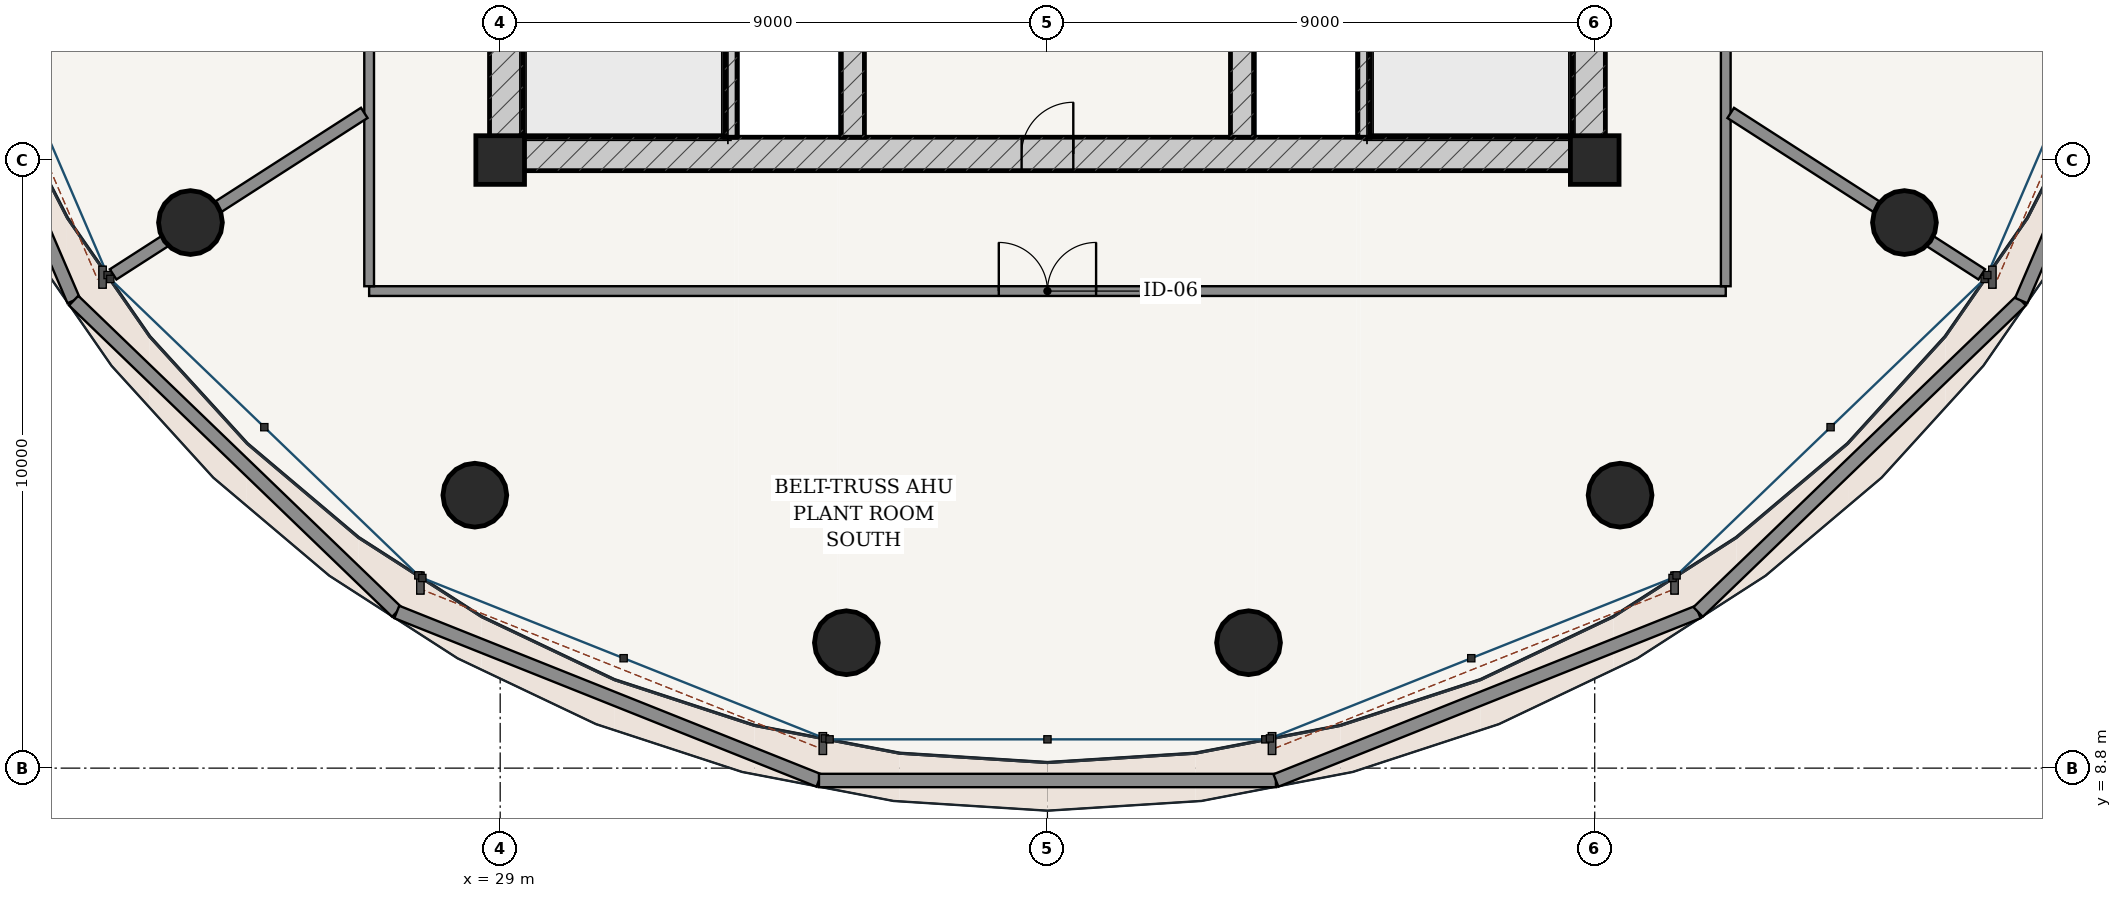
"""IFC4 building model, lengths in metres.
Left out: names, types, materials, properties, quantities, classifications, styles, units other than length and angle.
Written with IfcOpenShell. Run it as: python <this file> out.ifc"""

import sys

from ifc_helpers import new_model, si_unit, direction, frame, frame_2d, origin, origin_2d, place, context, subcontext, project, spatial, rectangle, hollow_circle, extrude, source, transform, mapped, element, fill, save


model = new_model("IFC4")
c1 = context("Model", 3, precision=1e-05, world=origin(), true_north=direction((-0.2419218956, 0.970295726276)))
c2 = subcontext(c1, "Body", "Model", "MODEL_VIEW")
j1 = project(units=[si_unit("LENGTHUNIT", "METRE"), si_unit("PLANEANGLEUNIT", "RADIAN")], contexts=[c1])
p1 = place(None, origin())
s1 = spatial("IfcSite", under=j1, at=p1, CompositionType="ELEMENT")
p2 = place(p1, origin())
s2 = spatial("IfcBuilding", under=s1, at=p2, CompositionType="ELEMENT")
p3 = place(p2, frame((0.0, 0.0, 300.7)))
s3 = spatial("IfcBuildingStorey", under=s2, at=p3, CompositionType="ELEMENT", Elevation=300.7)
for number, where, z_axis, x_axis in (
    (1, (29.0, 18.8, 0.0), (0.0, 0.0, 1.0), (1.0, 0.0, 0.0)),
    (2, (47.0, 18.8, 0.0), (0.0, 0.0, 1.0), (1.0, 0.0, 0.0)),
):
    element("IfcColumn", number, at=place(p3, frame(where, z_axis=z_axis, x_axis=x_axis)), inside=s3, PredefinedType="COLUMN", context=c2, shape_type="SweptSolid", body=[
        extrude(rectangle(XDim=0.8, YDim=0.8, at=origin_2d()), origin(), (0.0, 0.0, 1.0), 5.4),
    ])
p4 = place(p3, frame((28.825, 18.9, 0.0), z_axis=(0.0, 0.0, 1.0), x_axis=(1.0, 0.0, 0.0)))
e3 = element("IfcWall", 3, at=p4, inside=s3, PredefinedType="SHEAR", context=c2, shape_type="SweptSolid", body=[
    extrude(rectangle(XDim=18.35, YDim=0.55, at=frame_2d((9.175, 0.0))), origin(), (0.0, 0.0, 1.0), 4.98),
])
p5 = place(p4, frame((8.75, 0.0, 0.0)))
e4 = element("IfcOpeningElement", 4, at=p5, cuts=e3, PredefinedType="OPENING", context=c2, shape_type="SweptSolid", body=[
    extrude(rectangle(XDim=0.85, YDim=2.1, at=frame_2d((0.425, 1.05))), frame((0.0, 0.285, 0.0), z_axis=(0.0, -1.0, 0.0), x_axis=(1.0, 0.0, 0.0)), (0.0, 0.0, 1.0), 0.57),
])
p6 = place(p3, frame((29.1, 19.175, 0.0), z_axis=(0.0, 0.0, 1.0), x_axis=(0.0, 1.0, 0.0)))
e5 = element("IfcWall", 5, at=p6, inside=s3, PredefinedType="SHEAR", context=c2, shape_type="SweptSolid", body=[
    extrude(rectangle(XDim=15.25, YDim=0.55, at=frame_2d((7.625, 0.0))), origin(), (0.0, 0.0, 1.0), 4.98),
])
p7 = place(p6, frame((9.875, 0.0, 0.0)))
e6 = element("IfcOpeningElement", 6, at=p7, cuts=e5, PredefinedType="OPENING", context=c2, shape_type="SweptSolid", body=[
    extrude(rectangle(XDim=1.5, YDim=2.2, at=frame_2d((0.75, 1.1))), frame((0.0, 0.285, 0.0), z_axis=(0.0, -1.0, 0.0), x_axis=(1.0, 0.0, 0.0)), (0.0, 0.0, 1.0), 0.57),
])
p8 = place(p3, frame((46.9, 19.175, 0.0), z_axis=(0.0, 0.0, 1.0), x_axis=(0.0, 1.0, 0.0)))
e7 = element("IfcWall", 7, at=p8, inside=s3, PredefinedType="SHEAR", context=c2, shape_type="SweptSolid", body=[
    extrude(rectangle(XDim=15.25, YDim=0.55, at=frame_2d((7.625, 0.0))), origin(), (0.0, 0.0, 1.0), 4.98),
])
p9 = place(p8, frame((9.875, 0.0, 0.0)))
e8 = element("IfcOpeningElement", 8, at=p9, cuts=e7, PredefinedType="OPENING", context=c2, shape_type="SweptSolid", body=[
    extrude(rectangle(XDim=1.5, YDim=2.2, at=frame_2d((0.75, 1.1))), frame((0.0, 0.285, 0.0), z_axis=(0.0, -1.0, 0.0), x_axis=(1.0, 0.0, 0.0)), (0.0, 0.0, 1.0), 0.57),
])
for number, where, z_axis, x_axis in (
    (9, (32.795, 19.175, 0.0), (0.0, 0.0, 1.0), (0.0, 1.0, 0.0)),
    (10, (43.205, 19.175, 0.0), (0.0, 0.0, 1.0), (0.0, 1.0, 0.0)),
):
    element("IfcWall", number, at=place(p3, frame(where, z_axis=z_axis, x_axis=x_axis)), inside=s3, PredefinedType="SOLIDWALL", context=c2, shape_type="SweptSolid", body=[
        extrude(rectangle(XDim=7.375, YDim=0.2, at=frame_2d((3.688, 0.0))), origin(), (0.0, 0.0, 1.0), 4.98),
    ])
p10 = place(p3, frame((34.8, 19.175, 0.0), z_axis=(0.0, 0.0, 1.0), x_axis=(0.0, 1.0, 0.0)))
e11 = element("IfcWall", 11, at=p10, inside=s3, PredefinedType="SHEAR", context=c2, shape_type="SweptSolid", body=[
    extrude(rectangle(XDim=15.25, YDim=0.38, at=frame_2d((7.625, 0.0))), origin(), (0.0, 0.0, 1.0), 4.98),
])
p11 = place(p10, frame((7.8, 0.0, 0.0)))
e12 = element("IfcOpeningElement", 12, at=p11, cuts=e11, PredefinedType="OPENING", context=c2, shape_type="SweptSolid", body=[
    extrude(rectangle(XDim=1.05, YDim=2.15, at=frame_2d((0.525, 1.075))), frame((0.0, 0.2, 0.0), z_axis=(0.0, -1.0, 0.0), x_axis=(1.0, 0.0, 0.0)), (0.0, 0.0, 1.0), 0.4),
])
p12 = place(p3, frame((41.2, 19.175, 0.0), z_axis=(0.0, 0.0, 1.0), x_axis=(0.0, 1.0, 0.0)))
e13 = element("IfcWall", 13, at=p12, inside=s3, PredefinedType="SHEAR", context=c2, shape_type="SweptSolid", body=[
    extrude(rectangle(XDim=15.25, YDim=0.38, at=frame_2d((7.625, 0.0))), origin(), (0.0, 0.0, 1.0), 4.98),
])
p13 = place(p12, frame((7.8, 0.0, 0.0)))
e14 = element("IfcOpeningElement", 14, at=p13, cuts=e13, PredefinedType="OPENING", context=c2, shape_type="SweptSolid", body=[
    extrude(rectangle(XDim=1.05, YDim=2.15, at=frame_2d((0.525, 1.075))), frame((0.0, 0.2, 0.0), z_axis=(0.0, -1.0, 0.0), x_axis=(1.0, 0.0, 0.0)), (0.0, 0.0, 1.0), 0.4),
])
for number, where, z_axis, x_axis in (
    (15, (23.906, 17.772, 0.0), (0.0, 0.0, 1.0), (1.0, 0.0, 0.0)),
    (16, (28.583, 13.289, 0.0), (0.0, 0.0, 1.0), (1.0, 0.0, 0.0)),
    (17, (34.693, 10.862, 0.0), (0.0, 0.0, 1.0), (1.0, 0.0, 0.0)),
    (18, (41.307, 10.862, 0.0), (0.0, 0.0, 1.0), (1.0, 0.0, 0.0)),
    (19, (47.417, 13.289, 0.0), (0.0, 0.0, 1.0), (1.0, 0.0, 0.0)),
    (20, (52.094, 17.772, 0.0), (0.0, 0.0, 1.0), (1.0, 0.0, 0.0)),
):
    element("IfcColumn", number, at=place(p3, frame(where, z_axis=z_axis, x_axis=x_axis)), inside=s3, PredefinedType="COLUMN", context=c2, shape_type="SweptSolid", body=[
        extrude(hollow_circle(Radius=0.525, WallThickness=0.035, at=origin_2d()), origin(), (0.0, 0.0, 1.0), 5.4),
    ])
p14 = place(p3, frame((19.11, 23.179, 0.0), z_axis=(0.0, 0.0, 1.0), x_axis=(0.394882037325, -0.918731830622, 0.0)))
e21 = element("IfcWall", 21, at=p14, inside=s3, PredefinedType="PARAPET", context=c2, shape_type="SweptSolid", body=[
    extrude(rectangle(XDim=7.282, YDim=0.22, at=frame_2d((3.641, 0.0))), origin(), (0.0, 0.0, 1.0), 1.15),
])
p15 = place(p3, frame((21.986, 16.489, 0.0), z_axis=(0.0, 0.0, 1.0), x_axis=(0.720086306967, -0.693884508055, 0.0)))
e22 = element("IfcWall", 22, at=p15, inside=s3, PredefinedType="PARAPET", context=c2, shape_type="SweptSolid", body=[
    extrude(rectangle(XDim=7.38, YDim=0.22, at=frame_2d((3.69, 0.0))), origin(), (0.0, 0.0, 1.0), 1.15),
])
p16 = place(p3, frame((27.3, 11.368, 0.0), z_axis=(0.0, 0.0, 1.0), x_axis=(0.928748972375, -0.370709247677, 0.0)))
e23 = element("IfcWall", 23, at=p16, inside=s3, PredefinedType="PARAPET", context=c2, shape_type="SweptSolid", body=[
    extrude(rectangle(XDim=7.476, YDim=0.22, at=frame_2d((3.738, 0.0))), origin(), (0.0, 0.0, 1.0), 1.15),
])
p17 = place(p3, frame((34.243, 8.597, 0.0), z_axis=(0.0, 0.0, 1.0), x_axis=(1.0, 0.0, 0.0)))
e24 = element("IfcWall", 24, at=p17, inside=s3, PredefinedType="PARAPET", context=c2, shape_type="SweptSolid", body=[
    extrude(rectangle(XDim=7.515, YDim=0.22, at=frame_2d((3.757, 0.0))), origin(), (0.0, 0.0, 1.0), 1.15),
])
p18 = place(p3, frame((41.757, 8.597, 0.0), z_axis=(0.0, 0.0, 1.0), x_axis=(0.928748972375, 0.370709247677, 0.0)))
e25 = element("IfcWall", 25, at=p18, inside=s3, PredefinedType="PARAPET", context=c2, shape_type="SweptSolid", body=[
    extrude(rectangle(XDim=7.476, YDim=0.22, at=frame_2d((3.738, 0.0))), origin(), (0.0, 0.0, 1.0), 1.15),
])
p19 = place(p3, frame((48.7, 11.368, 0.0), z_axis=(0.0, 0.0, 1.0), x_axis=(0.720086306967, 0.693884508055, 0.0)))
e26 = element("IfcWall", 26, at=p19, inside=s3, PredefinedType="PARAPET", context=c2, shape_type="SweptSolid", body=[
    extrude(rectangle(XDim=7.38, YDim=0.22, at=frame_2d((3.69, 0.0))), origin(), (0.0, 0.0, 1.0), 1.15),
])
p20 = place(p3, frame((54.014, 16.489, 0.0), z_axis=(0.0, 0.0, 1.0), x_axis=(0.394882037325, 0.918731830622, 0.0)))
e27 = element("IfcWall", 27, at=p20, inside=s3, PredefinedType="PARAPET", context=c2, shape_type="SweptSolid", body=[
    extrude(rectangle(XDim=7.282, YDim=0.22, at=frame_2d((3.641, 0.0))), origin(), (0.0, 0.0, 1.0), 1.15),
])
p21 = place(p3, frame((26.845, 16.645, 0.0), z_axis=(0.0, 0.0, 1.0), x_axis=(1.0, 0.0, 0.0)))
e28 = element("IfcWall", 28, at=p21, inside=s3, PredefinedType="PARTITIONING", context=c2, shape_type="SweptSolid", body=[
    extrude(rectangle(XDim=22.31, YDim=0.16, at=frame_2d((11.155, 0.0))), origin(), (0.0, 0.0, 1.0), 4.552),
])
p22 = place(p21, frame((10.355, 0.0, 0.0)))
e29 = element("IfcOpeningElement", 29, at=p22, cuts=e28, PredefinedType="OPENING", context=c2, shape_type="SweptSolid", body=[
    extrude(rectangle(XDim=1.6, YDim=2.25, at=frame_2d((0.8, 1.125))), frame((0.0, 0.09, 0.0), z_axis=(0.0, -1.0, 0.0), x_axis=(1.0, 0.0, 0.0)), (0.0, 0.0, 1.0), 0.18),
])
p23 = place(p3, frame((26.845, 16.725, 0.0), z_axis=(0.0, 0.0, 1.0), x_axis=(0.0, 1.0, 0.0)))
e30 = element("IfcWall", 30, at=p23, inside=s3, PredefinedType="PARTITIONING", context=c2, shape_type="SweptSolid", body=[
    extrude(rectangle(XDim=20.15, YDim=0.16, at=frame_2d((10.075, 0.0))), origin(), (0.0, 0.0, 1.0), 4.552),
])
p24 = place(p23, frame((9.325, 0.0, 0.0)))
e31 = element("IfcOpeningElement", 31, at=p24, cuts=e30, PredefinedType="OPENING", context=c2, shape_type="SweptSolid", body=[
    extrude(rectangle(XDim=1.5, YDim=2.2, at=frame_2d((0.75, 1.1))), frame((0.0, 0.09, 0.0), z_axis=(0.0, -1.0, 0.0), x_axis=(1.0, 0.0, 0.0)), (0.0, 0.0, 1.0), 0.18),
])
p25 = place(p3, frame((49.155, 16.725, 0.0), z_axis=(0.0, 0.0, 1.0), x_axis=(0.0, 1.0, 0.0)))
e32 = element("IfcWall", 32, at=p25, inside=s3, PredefinedType="PARTITIONING", context=c2, shape_type="SweptSolid", body=[
    extrude(rectangle(XDim=20.15, YDim=0.16, at=frame_2d((10.075, 0.0))), origin(), (0.0, 0.0, 1.0), 4.552),
])
p26 = place(p25, frame((9.275, 0.0, 0.0)))
e33 = element("IfcOpeningElement", 33, at=p26, cuts=e32, PredefinedType="OPENING", context=c2, shape_type="SweptSolid", body=[
    extrude(rectangle(XDim=1.6, YDim=2.25, at=frame_2d((0.8, 1.125))), frame((0.0, 0.09, 0.0), z_axis=(0.0, -1.0, 0.0), x_axis=(1.0, 0.0, 0.0)), (0.0, 0.0, 1.0), 0.18),
])
p27 = place(p3, frame((26.765, 19.575, 0.0), z_axis=(0.0, 0.0, 1.0), x_axis=(-0.841100921619, -0.540878211478, 0.0)))
e34 = element("IfcWall", 34, at=p27, inside=s3, PredefinedType="PARTITIONING", context=c2, shape_type="SweptSolid", body=[
    extrude(rectangle(XDim=4.91, YDim=0.2, at=frame_2d((2.455, 0.0))), origin(), (0.0, 0.0, 1.0), 4.33),
])
p28 = place(p3, frame((49.237, 19.574, 0.0), z_axis=(0.0, 0.0, 1.0), x_axis=(0.841104126714, -0.540873227314, 0.0)))
e35 = element("IfcWall", 35, at=p28, inside=s3, PredefinedType="PARTITIONING", context=c2, shape_type="SweptSolid", body=[
    extrude(rectangle(XDim=4.908, YDim=0.2, at=frame_2d((2.454, 0.0))), origin(), (0.0, 0.0, 1.0), 4.33),
])
m1 = source(origin(), c2, "Body", "SweptSolid", [
    extrude(rectangle(XDim=0.85, YDim=2.1, at=frame_2d((0.425, 1.05))), frame((0.0, 0.025, 0.0), z_axis=(0.0, -1.0, 0.0), x_axis=(1.0, 0.0, 0.0)), (0.0, 0.0, 1.0), 0.05),
])
p29 = place(p5, origin())
e36 = element("IfcDoor", 36, at=p29, inside=s3, OperationType="SINGLE_SWING_RIGHT", PredefinedType="DOOR", context=c2, shape_type="MappedRepresentation", body=[
    mapped(m1, transform((0.0, 0.0, 0.0), scale=1.0)),
])
fill(e4, e36)
m2 = source(origin(), c2, "Body", "SweptSolid", [
    extrude(rectangle(XDim=1.6, YDim=2.25, at=frame_2d((0.8, 1.125))), frame((0.0, 0.025, 0.0), z_axis=(0.0, -1.0, 0.0), x_axis=(1.0, 0.0, 0.0)), (0.0, 0.0, 1.0), 0.05),
])
p30 = place(p22, origin())
e37 = element("IfcDoor", 37, at=p30, inside=s3, OperationType="DOUBLE_DOOR_SINGLE_SWING", PredefinedType="DOOR", context=c2, shape_type="MappedRepresentation", body=[
    mapped(m2, transform((0.0, 0.0, 0.0), scale=1.0)),
])
fill(e29, e37)
save(model, sys.argv[1])
